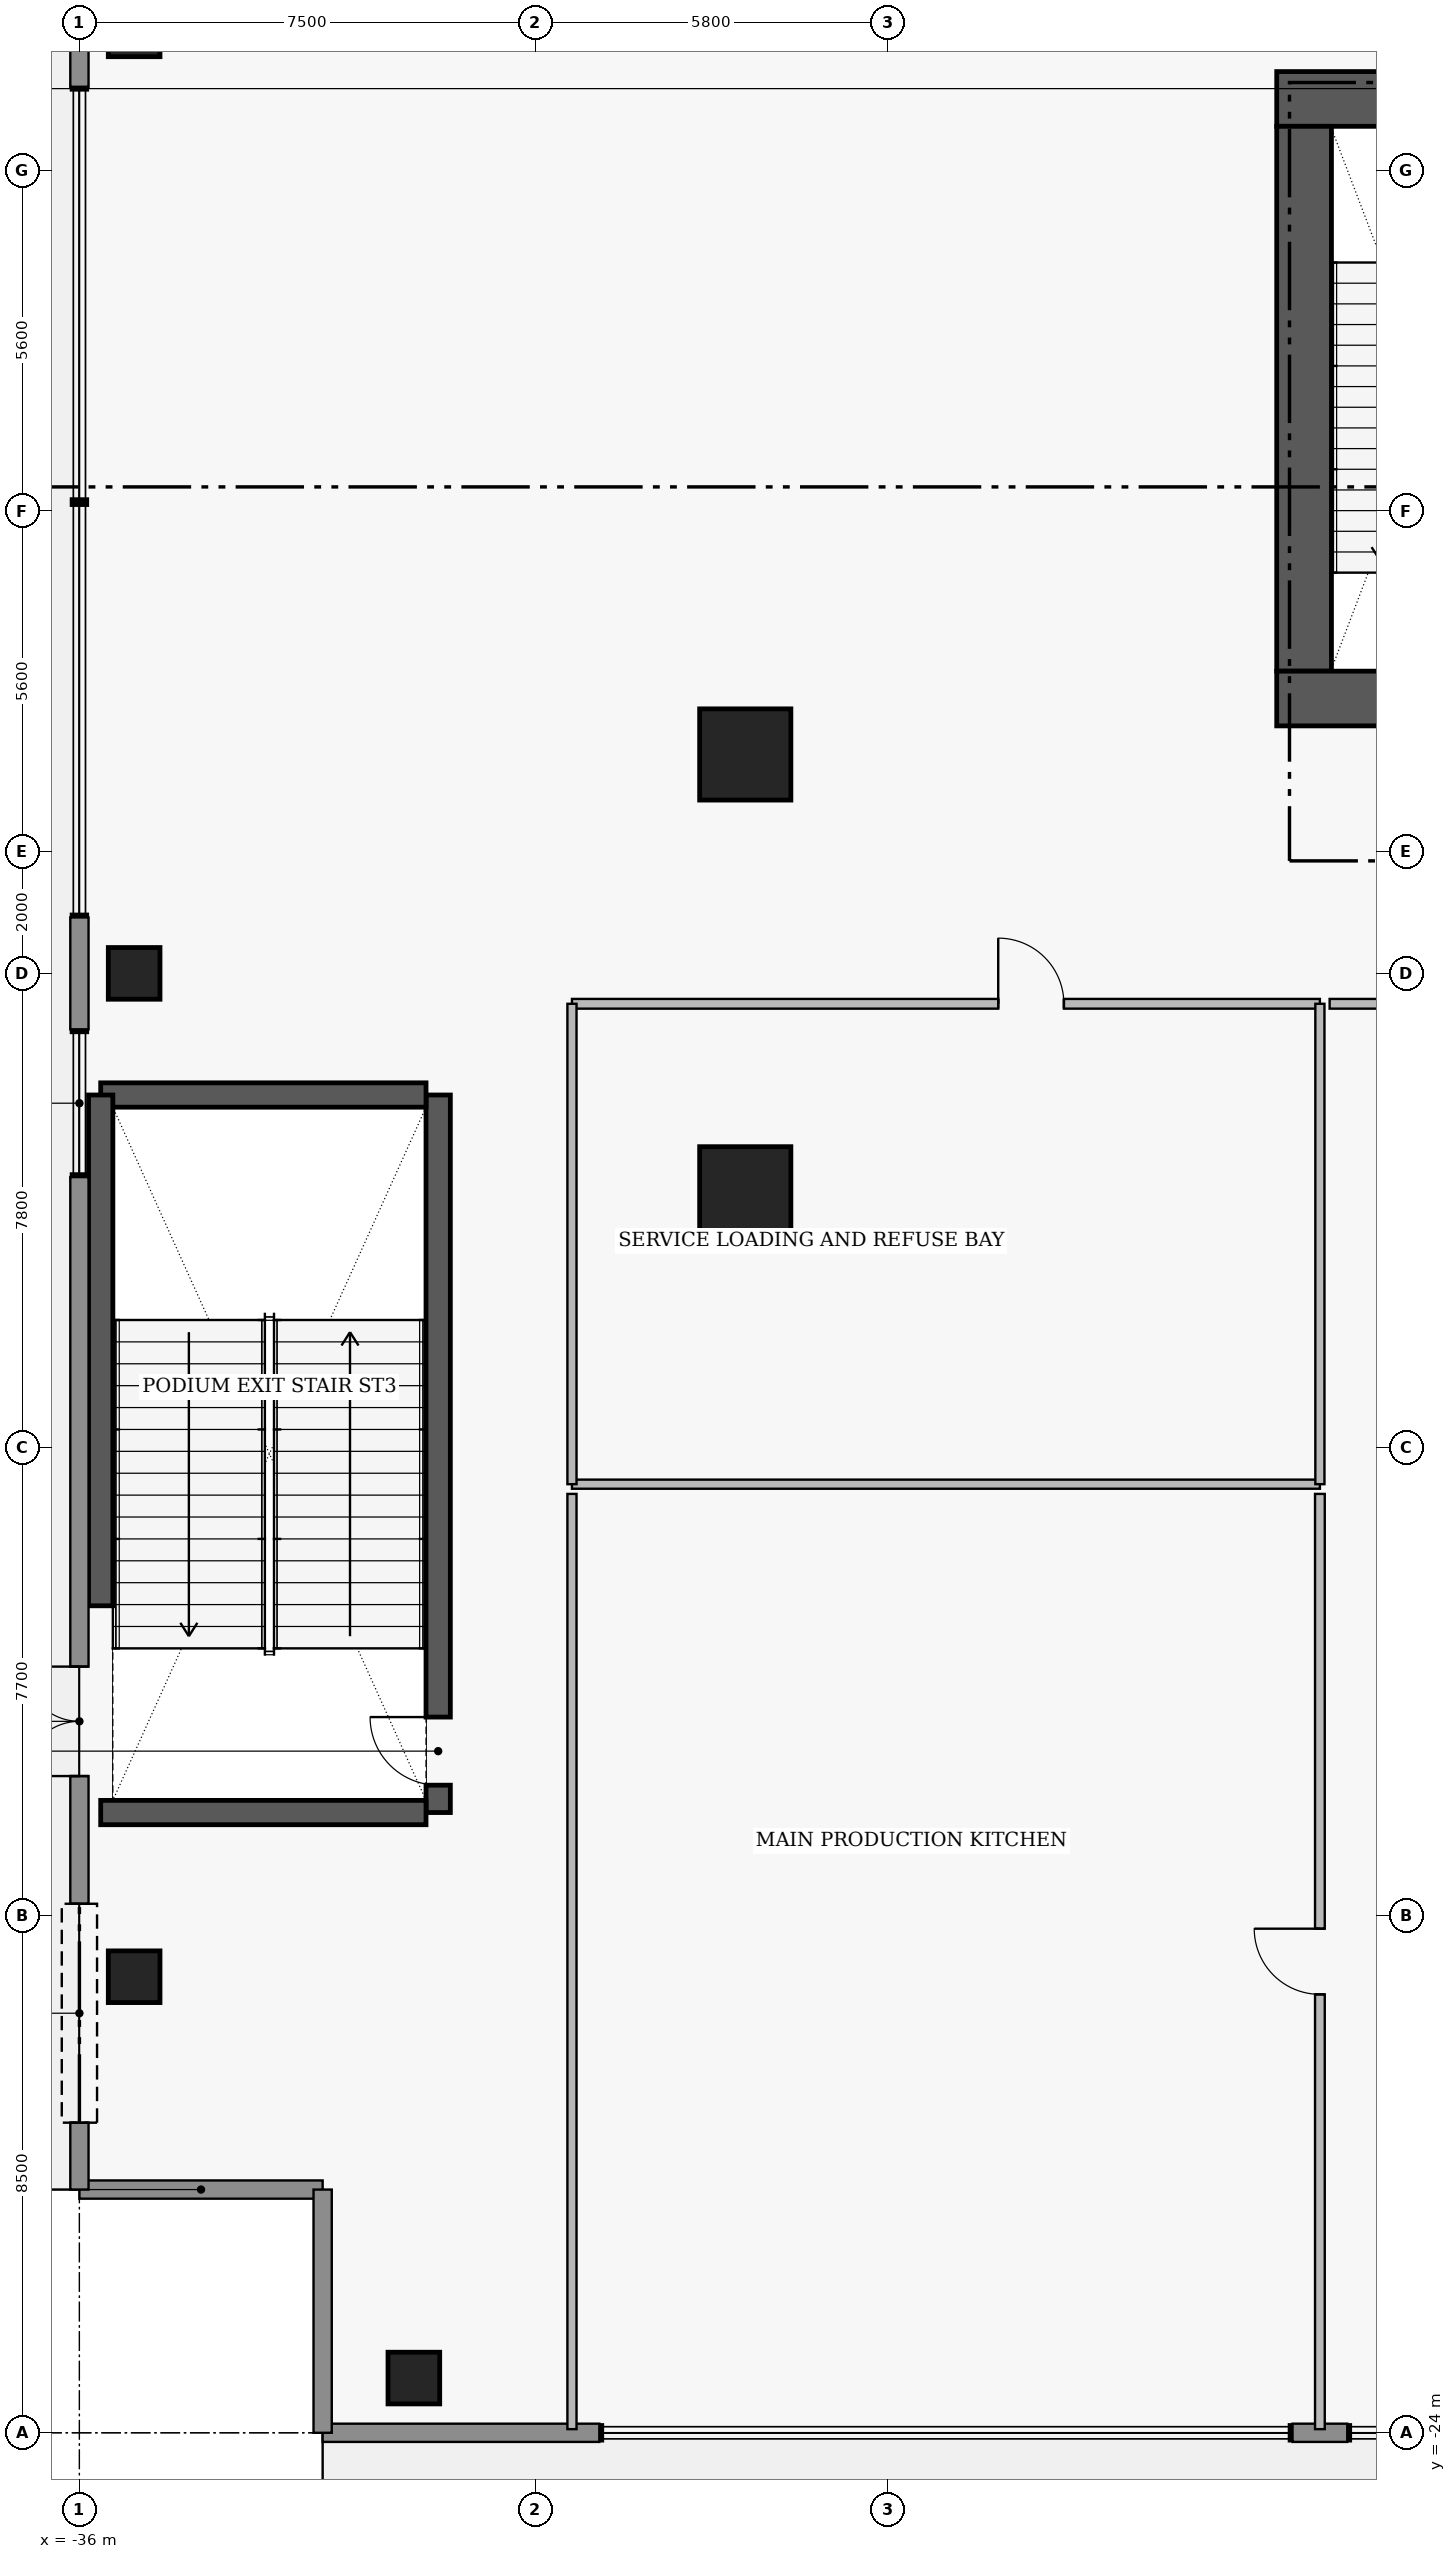
"""IFC4 building model, lengths in metres.
Left out: names, types, materials, properties, quantities, classifications, styles, units other than length and angle.
Written with IfcOpenShell. Run it as: python <this file> out.ifc"""

import sys

from ifc_helpers import new_model, si_unit, direction, frame, frame_2d, origin, origin_2d, place, context, subcontext, project, spatial, rectangle, extrude, element, fill, save


model = new_model("IFC4")
c1 = context("Model", 3, precision=1e-05, world=origin(), true_north=direction((0.0, 1.0)))
c2 = subcontext(c1, "Body", "Model", "MODEL_VIEW")
j1 = project(units=[si_unit("LENGTHUNIT", "METRE"), si_unit("PLANEANGLEUNIT", "RADIAN")], contexts=[c1])
p1 = place(None, origin())
s1 = spatial("IfcSite", under=j1, at=p1, CompositionType="ELEMENT")
p2 = place(p1, origin())
s2 = spatial("IfcBuilding", under=s1, at=p2, CompositionType="ELEMENT")
p3 = place(p2, origin())
s3 = spatial("IfcBuildingStorey", under=s2, at=p3, CompositionType="ELEMENT", Elevation=0.0)
p4 = place(p3, frame((-16.31, 14.38, 0.0), z_axis=(0.0, 0.0, 1.0), x_axis=(1.0, 0.0, 0.0)))
e1 = element("IfcWall", 1, at=p4, inside=s3, PredefinedType="SHEAR", context=c2, shape_type="SweptSolid", body=[
    extrude(rectangle(XDim=4.71, YDim=0.9, at=frame_2d((2.355, 0.0))), origin(), (0.0, 0.0, 1.0), 5.81),
])
p5 = place(p3, frame((-15.86, 4.97, 0.0), z_axis=(0.0, 0.0, 1.0), x_axis=(0.0, 1.0, 0.0)))
e2 = element("IfcWall", 2, at=p5, inside=s3, PredefinedType="SHEAR", context=c2, shape_type="SweptSolid", body=[
    extrude(rectangle(XDim=8.96, YDim=0.9, at=frame_2d((4.48, 0.0))), origin(), (0.0, 0.0, 1.0), 5.81),
])
p6 = place(p3, frame((-16.31, 4.52, 0.0), z_axis=(0.0, 0.0, 1.0), x_axis=(1.0, 0.0, 0.0)))
e3 = element("IfcWall", 3, at=p6, inside=s3, PredefinedType="SHEAR", context=c2, shape_type="SweptSolid", body=[
    extrude(rectangle(XDim=4.71, YDim=0.9, at=frame_2d((2.355, 0.0))), origin(), (0.0, 0.0, 1.0), 5.81),
])
p7 = place(p3, frame((-30.1, -13.8, 0.0), z_axis=(0.0, 0.0, 1.0), x_axis=(0.0, 1.0, 0.0)))
e4 = element("IfcWall", 4, at=p7, inside=s3, PredefinedType="SHEAR", context=c2, shape_type="SweptSolid", body=[
    extrude(rectangle(XDim=11.8, YDim=0.4, at=frame_2d((5.9, 0.0))), origin(), (0.0, 0.0, 1.0), 5.81),
])
p8 = place(p7, frame((0.45, 0.0, 0.0)))
e5 = element("IfcOpeningElement", 5, at=p8, cuts=e4, PredefinedType="OPENING", context=c2, shape_type="SweptSolid", body=[
    extrude(rectangle(XDim=1.12, YDim=2.22, at=frame_2d((0.56, 1.11))), frame((0.0, 0.21, 0.0), z_axis=(0.0, -1.0, 0.0), x_axis=(1.0, 0.0, 0.0)), (0.0, 0.0, 1.0), 0.42),
])
for number, where, z_axis, x_axis in (
    (6, (-35.65, -13.8, 0.0), (0.0, 0.0, 1.0), (1.0, 0.0, 0.0)),
    (7, (-35.65, -2.0, 0.0), (0.0, 0.0, 1.0), (1.0, 0.0, 0.0)),
):
    element("IfcWall", number, at=place(p3, frame(where, z_axis=z_axis, x_axis=x_axis)), inside=s3, PredefinedType="SHEAR", context=c2, shape_type="SweptSolid", body=[
        extrude(rectangle(XDim=5.35, YDim=0.4, at=frame_2d((2.675, 0.0))), origin(), (0.0, 0.0, 1.0), 5.81),
    ])
p9 = place(p3, frame((-35.65, -10.4, 0.0), z_axis=(0.0, 0.0, 1.0), x_axis=(0.0, 1.0, 0.0)))
e8 = element("IfcWall", 8, at=p9, inside=s3, PredefinedType="SHEAR", context=c2, shape_type="SweptSolid", body=[
    extrude(rectangle(XDim=8.4, YDim=0.4, at=frame_2d((4.2, 0.0))), origin(), (0.0, 0.0, 1.0), 5.81),
])
for number, where, z_axis, x_axis in (
    (9, (-25.05, -3.6, 0.0), (0.0, 0.0, 1.0), (1.0, 0.0, 0.0)),
    (10, (-25.05, 3.6, 0.0), (0.0, 0.0, 1.0), (1.0, 0.0, 0.0)),
):
    element("IfcColumn", number, at=place(p3, frame(where, z_axis=z_axis, x_axis=x_axis)), inside=s3, PredefinedType="COLUMN", context=c2, shape_type="SweptSolid", body=[
        extrude(rectangle(XDim=1.5, YDim=1.5, at=origin_2d()), origin(), (0.0, 0.0, 1.0), 6.0),
    ])
for number, where, z_axis, x_axis in (
    (11, (-30.5, -23.1, 0.0), (0.0, 0.0, 1.0), (1.0, 0.0, 0.0)),
    (12, (-35.1, -16.5, 0.0), (0.0, 0.0, 1.0), (1.0, 0.0, 0.0)),
    (13, (-35.1, 0.0, 0.0), (0.0, 0.0, 1.0), (1.0, 0.0, 0.0)),
    (14, (-35.1, 15.5, 0.0), (0.0, 0.0, 1.0), (1.0, 0.0, 0.0)),
):
    element("IfcColumn", number, at=place(p3, frame(where, z_axis=z_axis, x_axis=x_axis)), inside=s3, PredefinedType="COLUMN", context=c2, shape_type="SweptSolid", body=[
        extrude(rectangle(XDim=0.85, YDim=0.85, at=origin_2d()), origin(), (0.0, 0.0, 1.0), 6.0),
    ])
p10 = place(p3, frame((-32.0, -20.0, 0.0), z_axis=(0.0, 0.0, 1.0), x_axis=(-1.0, 0.0, 0.0)))
e15 = element("IfcWall", 15, at=p10, inside=s3, PredefinedType="STANDARD", context=c2, shape_type="SweptSolid", body=[
    extrude(rectangle(XDim=4.0, YDim=0.3, at=frame_2d((2.0, 0.0))), origin(), (0.0, 0.0, 1.0), 5.75),
])
p11 = place(p3, frame((-36.0, -20.0, 0.0), z_axis=(0.0, 0.0, 1.0), x_axis=(0.0, 1.0, 0.0)))
e16 = element("IfcWall", 16, at=p11, inside=s3, PredefinedType="STANDARD", context=c2, shape_type="SweptSolid", body=[
    extrude(rectangle(XDim=16.65, YDim=0.3, at=frame_2d((8.325, 0.0))), origin(), (0.0, 0.0, 1.0), 5.75),
])
p12 = place(p11, frame((6.8, 0.0, 0.0)))
e17 = element("IfcOpeningElement", 17, at=p12, cuts=e16, PredefinedType="OPENING", context=c2, shape_type="SweptSolid", body=[
    extrude(rectangle(XDim=1.8, YDim=2.4, at=frame_2d((0.9, 1.2))), frame((0.0, 0.16, 0.0), z_axis=(0.0, -1.0, 0.0), x_axis=(1.0, 0.0, 0.0)), (0.0, 0.0, 1.0), 0.32),
])
p13 = place(p11, frame((1.1, 0.0, 0.0)))
e18 = element("IfcOpeningElement", 18, at=p13, cuts=e16, PredefinedType="OPENING", context=c2, shape_type="SweptSolid", body=[
    extrude(rectangle(XDim=3.6, YDim=3.4, at=frame_2d((1.8, 1.7))), frame((0.0, 0.16, 0.0), z_axis=(0.0, -1.0, 0.0), x_axis=(1.0, 0.0, 0.0)), (0.0, 0.0, 1.0), 0.32),
])
for number, where, z_axis, x_axis in (
    (19, (-36.0, -0.92, 0.0), (0.0, 0.0, 1.0), (0.0, 1.0, 0.0)),
    (20, (-36.0, 14.58, 0.0), (0.0, 0.0, 1.0), (0.0, 1.0, 0.0)),
):
    element("IfcWall", number, at=place(p3, frame(where, z_axis=z_axis, x_axis=x_axis)), inside=s3, PredefinedType="STANDARD", context=c2, shape_type="SweptSolid", body=[
        extrude(rectangle(XDim=1.84, YDim=0.3, at=frame_2d((0.92, 0.0))), origin(), (0.0, 0.0, 1.0), 5.75),
    ])
p14 = place(p3, frame((-15.15, -24.0, 0.0), z_axis=(0.0, 0.0, 1.0), x_axis=(-1.0, 0.0, 0.0)))
e21 = element("IfcWall", 21, at=p14, inside=s3, PredefinedType="STANDARD", context=c2, shape_type="SweptSolid", body=[
    extrude(rectangle(XDim=0.9, YDim=0.3, at=frame_2d((0.45, 0.0))), origin(), (0.0, 0.0, 1.0), 5.75),
])
p15 = place(p3, frame((-27.45, -24.0, 0.0), z_axis=(0.0, 0.0, 1.0), x_axis=(-1.0, 0.0, 0.0)))
e22 = element("IfcWall", 22, at=p15, inside=s3, PredefinedType="STANDARD", context=c2, shape_type="SweptSolid", body=[
    extrude(rectangle(XDim=4.55, YDim=0.3, at=frame_2d((2.275, 0.0))), origin(), (0.0, 0.0, 1.0), 5.75),
])
p16 = place(p3, frame((-32.0, -24.0, 0.0), z_axis=(0.0, 0.0, 1.0), x_axis=(0.0, 1.0, 0.0)))
e23 = element("IfcWall", 23, at=p16, inside=s3, PredefinedType="STANDARD", context=c2, shape_type="SweptSolid", body=[
    extrude(rectangle(XDim=4.0, YDim=0.3, at=frame_2d((2.0, 0.0))), origin(), (0.0, 0.0, 1.0), 5.75),
])
p17 = place(p3, frame((-27.9, -0.5, 0.0), z_axis=(0.0, 0.0, 1.0), x_axis=(1.0, 0.0, 0.0)))
e24 = element("IfcWall", 24, at=p17, inside=s3, PredefinedType="PARTITIONING", context=c2, shape_type="SweptSolid", body=[
    extrude(rectangle(XDim=12.3, YDim=0.16, at=frame_2d((6.15, 0.0))), origin(), (0.0, 0.0, 1.0), 5.75),
])
p18 = place(p17, frame((7.01, 0.0, 0.0)))
e25 = element("IfcOpeningElement", 25, at=p18, cuts=e24, PredefinedType="OPENING", context=c2, shape_type="SweptSolid", body=[
    extrude(rectangle(XDim=1.08, YDim=2.18, at=frame_2d((0.54, 1.09))), frame((0.0, 0.09, 0.0), z_axis=(0.0, -1.0, 0.0), x_axis=(1.0, 0.0, 0.0)), (0.0, 0.0, 1.0), 0.18),
])
p19 = place(p3, frame((-15.6, -23.94, 0.0), z_axis=(0.0, 0.0, 1.0), x_axis=(0.0, 1.0, 0.0)))
e26 = element("IfcWall", 26, at=p19, inside=s3, PredefinedType="PARTITIONING", context=c2, shape_type="SweptSolid", body=[
    extrude(rectangle(XDim=15.38, YDim=0.16, at=frame_2d((7.69, 0.0))), origin(), (0.0, 0.0, 1.0), 5.75),
])
p20 = place(p19, frame((7.15, 0.0, 0.0)))
e27 = element("IfcOpeningElement", 27, at=p20, cuts=e26, PredefinedType="OPENING", context=c2, shape_type="SweptSolid", body=[
    extrude(rectangle(XDim=1.08, YDim=2.18, at=frame_2d((0.54, 1.09))), frame((0.0, 0.09, 0.0), z_axis=(0.0, -1.0, 0.0), x_axis=(1.0, 0.0, 0.0)), (0.0, 0.0, 1.0), 0.18),
])
p21 = place(p3, frame((-15.44, -0.5, 0.0), z_axis=(0.0, 0.0, 1.0), x_axis=(1.0, 0.0, 0.0)))
e28 = element("IfcWall", 28, at=p21, inside=s3, PredefinedType="PARTITIONING", context=c2, shape_type="SweptSolid", body=[
    extrude(rectangle(XDim=23.08, YDim=0.16, at=frame_2d((11.54, 0.0))), origin(), (0.0, 0.0, 1.0), 5.75),
])
p22 = place(p21, frame((12.65, 0.0, 0.0)))
e29 = element("IfcOpeningElement", 29, at=p22, cuts=e28, PredefinedType="OPENING", context=c2, shape_type="SweptSolid", body=[
    extrude(rectangle(XDim=1.08, YDim=2.18, at=frame_2d((0.54, 1.09))), frame((0.0, 0.09, 0.0), z_axis=(0.0, -1.0, 0.0), x_axis=(1.0, 0.0, 0.0)), (0.0, 0.0, 1.0), 0.18),
])
p23 = place(p3, frame((-27.9, -8.4, 0.0), z_axis=(0.0, 0.0, 1.0), x_axis=(1.0, 0.0, 0.0)))
e30 = element("IfcWall", 30, at=p23, inside=s3, PredefinedType="PARTITIONING", context=c2, shape_type="SweptSolid", body=[
    extrude(rectangle(XDim=12.3, YDim=0.15, at=frame_2d((6.15, 0.0))), origin(), (0.0, 0.0, 1.0), 5.75),
])
for number, where, z_axis, x_axis in (
    (31, (-27.9, -8.4, 0.0), (0.0, 0.0, 1.0), (0.0, 1.0, 0.0)),
    (32, (-15.6, -8.4, 0.0), (0.0, 0.0, 1.0), (0.0, 1.0, 0.0)),
):
    element("IfcWall", number, at=place(p3, frame(where, z_axis=z_axis, x_axis=x_axis)), inside=s3, PredefinedType="PARTITIONING", context=c2, shape_type="SweptSolid", body=[
        extrude(rectangle(XDim=7.9, YDim=0.15, at=frame_2d((3.95, 0.0))), origin(), (0.0, 0.0, 1.0), 5.75),
    ])
p24 = place(p3, frame((-27.9, -23.94, 0.0), z_axis=(0.0, 0.0, 1.0), x_axis=(0.0, 1.0, 0.0)))
e33 = element("IfcWall", 33, at=p24, inside=s3, PredefinedType="PARTITIONING", context=c2, shape_type="SweptSolid", body=[
    extrude(rectangle(XDim=15.38, YDim=0.15, at=frame_2d((7.69, 0.0))), origin(), (0.0, 0.0, 1.0), 5.75),
])
p25 = place(p12, origin())
e34 = element("IfcDoor", 34, at=p25, inside=s3, OperationType="DOUBLE_DOOR_SINGLE_SWING", PredefinedType="DOOR", context=c2, shape_type="SweptSolid", body=[
    extrude(rectangle(XDim=1.8, YDim=2.4, at=frame_2d((0.9, 1.2))), frame((0.0, 0.025, 0.0), z_axis=(0.0, -1.0, 0.0), x_axis=(1.0, 0.0, 0.0)), (0.0, 0.0, 1.0), 0.05),
])
fill(e17, e34)
p26 = place(p13, origin())
e35 = element("IfcDoor", 35, at=p26, inside=s3, OperationType="ROLLINGUP", PredefinedType="GATE", context=c2, shape_type="SweptSolid", body=[
    extrude(rectangle(XDim=3.6, YDim=3.4, at=frame_2d((1.8, 1.7))), frame((0.0, 0.025, 0.0), z_axis=(0.0, -1.0, 0.0), x_axis=(1.0, 0.0, 0.0)), (0.0, 0.0, 1.0), 0.05),
])
fill(e18, e35)
p27 = place(p8, origin())
e36 = element("IfcDoor", 36, at=p27, inside=s3, OperationType="SINGLE_SWING_RIGHT", PredefinedType="DOOR", context=c2, shape_type="SweptSolid", body=[
    extrude(rectangle(XDim=1.12, YDim=2.22, at=frame_2d((0.56, 1.11))), frame((0.0, 0.025, 0.0), z_axis=(0.0, -1.0, 0.0), x_axis=(1.0, 0.0, 0.0)), (0.0, 0.0, 1.0), 0.05),
])
fill(e5, e36)
p28 = place(p18, origin())
e37 = element("IfcDoor", 37, at=p28, inside=s3, OperationType="SINGLE_SWING_LEFT", PredefinedType="DOOR", context=c2, shape_type="SweptSolid", body=[
    extrude(rectangle(XDim=1.08, YDim=2.18, at=frame_2d((0.54, 1.09))), frame((0.0, 0.025, 0.0), z_axis=(0.0, -1.0, 0.0), x_axis=(1.0, 0.0, 0.0)), (0.0, 0.0, 1.0), 0.05),
])
fill(e25, e37)
p29 = place(p20, origin())
e38 = element("IfcDoor", 38, at=p29, inside=s3, OperationType="SINGLE_SWING_RIGHT", PredefinedType="DOOR", context=c2, shape_type="SweptSolid", body=[
    extrude(rectangle(XDim=1.08, YDim=2.18, at=frame_2d((0.54, 1.09))), frame((0.0, 0.025, 0.0), z_axis=(0.0, -1.0, 0.0), x_axis=(1.0, 0.0, 0.0)), (0.0, 0.0, 1.0), 0.05),
])
fill(e27, e38)
save(model, sys.argv[1])
